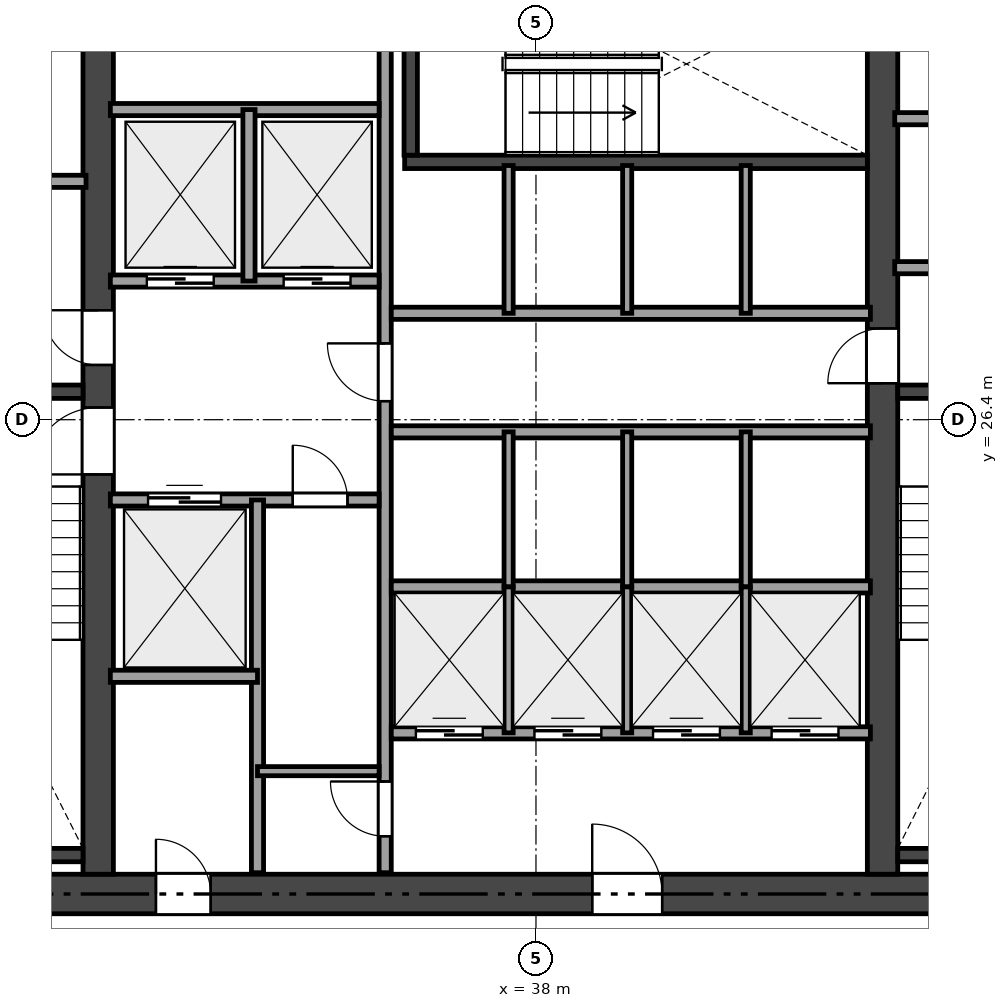
"""IFC4 building model, lengths in metres.
Left out: names, types, materials, properties, quantities, classifications, styles, units other than length and angle.
Written with IfcOpenShell. Run it as: python <this file> out.ifc"""

import sys

from ifc_helpers import new_model, si_unit, direction, frame, frame_2d, origin, place, context, subcontext, project, spatial, rectangle, extrude, element, fill, save


model = new_model("IFC4")
c1 = context("Model", 3, precision=1e-05, world=origin(), true_north=direction((0.0, 1.0)))
c2 = subcontext(c1, "Body", "Model", "MODEL_VIEW")
j1 = project(units=[si_unit("LENGTHUNIT", "METRE"), si_unit("PLANEANGLEUNIT", "RADIAN")], contexts=[c1])
p1 = place(None, origin())
s1 = spatial("IfcSite", under=j1, at=p1, CompositionType="ELEMENT")
p2 = place(p1, origin())
s2 = spatial("IfcBuilding", under=s1, at=p2, CompositionType="ELEMENT")
p3 = place(p2, frame((0.0, 0.0, 27.0)))
s3 = spatial("IfcBuildingStorey", under=s2, at=p3, CompositionType="ELEMENT", Elevation=27.0)
p4 = place(p3, frame((26.475, 18.6, 0.0), z_axis=(0.0, 0.0, 1.0), x_axis=(1.0, 0.0, 0.0)))
e1 = element("IfcWall", 1, at=p4, inside=s3, PredefinedType="SHEAR", context=c2, shape_type="SweptSolid", body=[
    extrude(rectangle(XDim=21.45, YDim=0.65, at=frame_2d((10.725, 0.0))), origin(), (0.0, 0.0, 1.0), 3.17),
])
p5 = place(p4, frame((12.45, 0.0, 0.0)))
e2 = element("IfcOpeningElement", 2, at=p5, cuts=e1, PredefinedType="OPENING", context=c2, shape_type="SweptSolid", body=[
    extrude(rectangle(XDim=1.15, YDim=2.15, at=frame_2d((0.575, 1.075))), frame((0.0, 0.335, 0.0), z_axis=(0.0, -1.0, 0.0), x_axis=(1.0, 0.0, 0.0)), (0.0, 0.0, 1.0), 0.67),
])
p6 = place(p4, frame((5.275, 0.0, 0.0)))
e3 = element("IfcOpeningElement", 3, at=p6, cuts=e1, PredefinedType="OPENING", context=c2, shape_type="SweptSolid", body=[
    extrude(rectangle(XDim=0.9, YDim=2.1, at=frame_2d((0.45, 1.05))), frame((0.0, 0.335, 0.0), z_axis=(0.0, -1.0, 0.0), x_axis=(1.0, 0.0, 0.0)), (0.0, 0.0, 1.0), 0.67),
])
p7 = place(p3, frame((30.8, 18.925, 0.0), z_axis=(0.0, 0.0, 1.0), x_axis=(0.0, 1.0, 0.0)))
e4 = element("IfcWall", 4, at=p7, inside=s3, PredefinedType="SHEAR", context=c2, shape_type="SweptSolid", body=[
    extrude(rectangle(XDim=14.95, YDim=0.5, at=frame_2d((7.475, 0.0))), origin(), (0.0, 0.0, 1.0), 3.17),
])
p8 = place(p7, frame((6.575, 0.0, 0.0)))
e5 = element("IfcOpeningElement", 5, at=p8, cuts=e4, PredefinedType="OPENING", context=c2, shape_type="SweptSolid", body=[
    extrude(rectangle(XDim=1.1, YDim=2.15, at=frame_2d((0.55, 1.075))), frame((0.0, 0.26, 0.0), z_axis=(0.0, -1.0, 0.0), x_axis=(1.0, 0.0, 0.0)), (0.0, 0.0, 1.0), 0.52),
])
p9 = place(p7, frame((8.375, 0.0, 0.0)))
e6 = element("IfcOpeningElement", 6, at=p9, cuts=e4, PredefinedType="OPENING", context=c2, shape_type="SweptSolid", body=[
    extrude(rectangle(XDim=0.9, YDim=2.1, at=frame_2d((0.45, 1.05))), frame((0.0, 0.26, 0.0), z_axis=(0.0, -1.0, 0.0), x_axis=(1.0, 0.0, 0.0)), (0.0, 0.0, 1.0), 0.52),
])
p10 = place(p3, frame((43.7, 18.925, 0.0), z_axis=(0.0, 0.0, 1.0), x_axis=(0.0, 1.0, 0.0)))
e7 = element("IfcWall", 7, at=p10, inside=s3, PredefinedType="SHEAR", context=c2, shape_type="SweptSolid", body=[
    extrude(rectangle(XDim=14.95, YDim=0.5, at=frame_2d((7.475, 0.0))), origin(), (0.0, 0.0, 1.0), 3.17),
])
p11 = place(p10, frame((8.075, 0.0, 0.0)))
e8 = element("IfcOpeningElement", 8, at=p11, cuts=e7, PredefinedType="OPENING", context=c2, shape_type="SweptSolid", body=[
    extrude(rectangle(XDim=0.9, YDim=2.1, at=frame_2d((0.45, 1.05))), frame((0.0, 0.26, 0.0), z_axis=(0.0, -1.0, 0.0), x_axis=(1.0, 0.0, 0.0)), (0.0, 0.0, 1.0), 0.52),
])
for number, where, z_axis, x_axis in (
    (9, (27.125, 26.86, 0.0), (0.0, 0.0, 1.0), (1.0, 0.0, 0.0)),
    (10, (27.125, 19.24, 0.0), (0.0, 0.0, 1.0), (1.0, 0.0, 0.0)),
):
    element("IfcWall", number, at=place(p3, frame(where, z_axis=z_axis, x_axis=x_axis)), inside=s3, PredefinedType="SHEAR", context=c2, shape_type="SweptSolid", body=[
        extrude(rectangle(XDim=3.425, YDim=0.22, at=frame_2d((1.712, 0.0))), origin(), (0.0, 0.0, 1.0), 3.17),
    ])
for number, where, z_axis, x_axis in (
    (11, (43.95, 26.86, 0.0), (0.0, 0.0, 1.0), (1.0, 0.0, 0.0)),
    (12, (43.95, 19.24, 0.0), (0.0, 0.0, 1.0), (1.0, 0.0, 0.0)),
):
    element("IfcWall", number, at=place(p3, frame(where, z_axis=z_axis, x_axis=x_axis)), inside=s3, PredefinedType="SHEAR", context=c2, shape_type="SweptSolid", body=[
        extrude(rectangle(XDim=3.325, YDim=0.22, at=frame_2d((1.663, 0.0))), origin(), (0.0, 0.0, 1.0), 3.17),
    ])
p12 = place(p3, frame((35.84, 30.64, 0.0), z_axis=(0.0, 0.0, 1.0), x_axis=(1.0, 0.0, 0.0)))
e13 = element("IfcWall", 13, at=p12, inside=s3, PredefinedType="SHEAR", context=c2, shape_type="SweptSolid", body=[
    extrude(rectangle(XDim=7.61, YDim=0.22, at=frame_2d((3.805, 0.0))), origin(), (0.0, 0.0, 1.0), 3.17),
])
p13 = place(p3, frame((35.94, 30.75, 0.0), z_axis=(0.0, 0.0, 1.0), x_axis=(0.0, 1.0, 0.0)))
e14 = element("IfcWall", 14, at=p13, inside=s3, PredefinedType="SHEAR", context=c2, shape_type="SweptSolid", body=[
    extrude(rectangle(XDim=3.125, YDim=0.22, at=frame_2d((1.562, 0.0))), origin(), (0.0, 0.0, 1.0), 3.17),
])
p14 = place(p3, frame((27.15, 30.32, 0.0), z_axis=(0.0, 0.0, 1.0), x_axis=(1.0, 0.0, 0.0)))
e15 = element("IfcWall", 15, at=p14, inside=s3, PredefinedType="SOLIDWALL", context=c2, shape_type="SweptSolid", body=[
    extrude(rectangle(XDim=3.45, YDim=0.2, at=frame_2d((1.725, 0.0))), origin(), (0.0, 0.0, 1.0), 3.17),
])
p15 = place(p3, frame((43.9, 28.9, 0.0), z_axis=(0.0, 0.0, 1.0), x_axis=(1.0, 0.0, 0.0)))
e16 = element("IfcWall", 16, at=p15, inside=s3, PredefinedType="SOLIDWALL", context=c2, shape_type="SweptSolid", body=[
    extrude(rectangle(XDim=3.35, YDim=0.2, at=frame_2d((1.675, 0.0))), origin(), (0.0, 0.0, 1.0), 3.17),
])
p16 = place(p15, frame((1.15, 0.0, 0.0)))
e17 = element("IfcOpeningElement", 17, at=p16, cuts=e16, PredefinedType="OPENING", context=c2, shape_type="SweptSolid", body=[
    extrude(rectangle(XDim=0.9, YDim=2.1, at=frame_2d((0.45, 1.05))), frame((0.0, 0.11, 0.0), z_axis=(0.0, -1.0, 0.0), x_axis=(1.0, 0.0, 0.0)), (0.0, 0.0, 1.0), 0.22),
])
p17 = place(p3, frame((43.9, 31.35, 0.0), z_axis=(0.0, 0.0, 1.0), x_axis=(1.0, 0.0, 0.0)))
e18 = element("IfcWall", 18, at=p17, inside=s3, PredefinedType="SOLIDWALL", context=c2, shape_type="SweptSolid", body=[
    extrude(rectangle(XDim=3.35, YDim=0.2, at=frame_2d((1.675, 0.0))), origin(), (0.0, 0.0, 1.0), 3.17),
])
p18 = place(p3, frame((35.52, 18.95, 0.0), z_axis=(0.0, 0.0, 1.0), x_axis=(0.0, 1.0, 0.0)))
e19 = element("IfcWall", 19, at=p18, inside=s3, PredefinedType="SOLIDWALL", context=c2, shape_type="SweptSolid", body=[
    extrude(rectangle(XDim=14.9, YDim=0.2, at=frame_2d((7.45, 0.0))), origin(), (0.0, 0.0, 1.0), 2.691),
])
p19 = place(p18, frame((7.755, 0.0, 0.0)))
e20 = element("IfcOpeningElement", 20, at=p19, cuts=e19, PredefinedType="OPENING", context=c2, shape_type="SweptSolid", body=[
    extrude(rectangle(XDim=0.95, YDim=2.15, at=frame_2d((0.475, 1.075))), frame((0.0, 0.11, 0.0), z_axis=(0.0, -1.0, 0.0), x_axis=(1.0, 0.0, 0.0)), (0.0, 0.0, 1.0), 0.22),
])
p20 = place(p18, frame((0.6, 0.0, 0.0)))
e21 = element("IfcOpeningElement", 21, at=p20, cuts=e19, PredefinedType="OPENING", context=c2, shape_type="SweptSolid", body=[
    extrude(rectangle(XDim=0.9, YDim=2.1, at=frame_2d((0.45, 1.05))), frame((0.0, 0.11, 0.0), z_axis=(0.0, -1.0, 0.0), x_axis=(1.0, 0.0, 0.0)), (0.0, 0.0, 1.0), 0.22),
])
p21 = place(p3, frame((31.0, 28.68, 0.0), z_axis=(0.0, 0.0, 1.0), x_axis=(1.0, 0.0, 0.0)))
e22 = element("IfcWall", 22, at=p21, inside=s3, PredefinedType="SOLIDWALL", context=c2, shape_type="SweptSolid", body=[
    extrude(rectangle(XDim=4.42, YDim=0.2, at=frame_2d((2.21, 0.0))), origin(), (0.0, 0.0, 1.0), 3.17),
])
p22 = place(p21, frame((0.6, 0.0, 0.0)))
e23 = element("IfcOpeningElement", 23, at=p22, cuts=e22, PredefinedType="OPENING", context=c2, shape_type="SweptSolid", body=[
    extrude(rectangle(XDim=1.1, YDim=2.15, at=frame_2d((0.55, 1.075))), frame((0.0, 0.11, 0.0), z_axis=(0.0, -1.0, 0.0), x_axis=(1.0, 0.0, 0.0)), (0.0, 0.0, 1.0), 0.22),
])
p23 = place(p21, frame((2.85, 0.0, 0.0)))
e24 = element("IfcOpeningElement", 24, at=p23, cuts=e22, PredefinedType="OPENING", context=c2, shape_type="SweptSolid", body=[
    extrude(rectangle(XDim=1.1, YDim=2.15, at=frame_2d((0.55, 1.075))), frame((0.0, 0.11, 0.0), z_axis=(0.0, -1.0, 0.0), x_axis=(1.0, 0.0, 0.0)), (0.0, 0.0, 1.0), 0.22),
])
p24 = place(p3, frame((31.0, 31.5, 0.0), z_axis=(0.0, 0.0, 1.0), x_axis=(1.0, 0.0, 0.0)))
e25 = element("IfcWall", 25, at=p24, inside=s3, PredefinedType="SOLIDWALL", context=c2, shape_type="SweptSolid", body=[
    extrude(rectangle(XDim=4.42, YDim=0.2, at=frame_2d((2.21, 0.0))), origin(), (0.0, 0.0, 1.0), 3.17),
])
p25 = place(p3, frame((33.28, 28.68, 0.0), z_axis=(0.0, 0.0, 1.0), x_axis=(0.0, 1.0, 0.0)))
e26 = element("IfcWall", 26, at=p25, inside=s3, PredefinedType="SOLIDWALL", context=c2, shape_type="SweptSolid", body=[
    extrude(rectangle(XDim=2.82, YDim=0.2, at=frame_2d((1.41, 0.0))), origin(), (0.0, 0.0, 1.0), 3.17),
])
p26 = place(p3, frame((31.0, 25.08, 0.0), z_axis=(0.0, 0.0, 1.0), x_axis=(1.0, 0.0, 0.0)))
e27 = element("IfcWall", 27, at=p26, inside=s3, PredefinedType="SOLIDWALL", context=c2, shape_type="SweptSolid", body=[
    extrude(rectangle(XDim=4.42, YDim=0.2, at=frame_2d((2.21, 0.0))), origin(), (0.0, 0.0, 1.0), 3.17),
])
p27 = place(p26, frame((3.0, 0.0, 0.0)))
e28 = element("IfcOpeningElement", 28, at=p27, cuts=e27, PredefinedType="OPENING", context=c2, shape_type="SweptSolid", body=[
    extrude(rectangle(XDim=0.9, YDim=2.1, at=frame_2d((0.45, 1.05))), frame((0.0, 0.11, 0.0), z_axis=(0.0, -1.0, 0.0), x_axis=(1.0, 0.0, 0.0)), (0.0, 0.0, 1.0), 0.22),
])
p28 = place(p26, frame((0.62, 0.0, 0.0)))
e29 = element("IfcOpeningElement", 29, at=p28, cuts=e27, PredefinedType="OPENING", context=c2, shape_type="SweptSolid", body=[
    extrude(rectangle(XDim=1.2, YDim=2.15, at=frame_2d((0.6, 1.075))), frame((0.0, 0.11, 0.0), z_axis=(0.0, -1.0, 0.0), x_axis=(1.0, 0.0, 0.0)), (0.0, 0.0, 1.0), 0.22),
])
p29 = place(p3, frame((33.42, 18.95, 0.0), z_axis=(0.0, 0.0, 1.0), x_axis=(0.0, 1.0, 0.0)))
e30 = element("IfcWall", 30, at=p29, inside=s3, PredefinedType="SOLIDWALL", context=c2, shape_type="SweptSolid", body=[
    extrude(rectangle(XDim=6.13, YDim=0.2, at=frame_2d((3.065, 0.0))), origin(), (0.0, 0.0, 1.0), 2.691),
])
p30 = place(p3, frame((31.0, 22.18, 0.0), z_axis=(0.0, 0.0, 1.0), x_axis=(1.0, 0.0, 0.0)))
e31 = element("IfcWall", 31, at=p30, inside=s3, PredefinedType="SOLIDWALL", context=c2, shape_type="SweptSolid", body=[
    extrude(rectangle(XDim=2.42, YDim=0.2, at=frame_2d((1.21, 0.0))), origin(), (0.0, 0.0, 1.0), 3.17),
])
p31 = place(p3, frame((33.42, 20.62, 0.0), z_axis=(0.0, 0.0, 1.0), x_axis=(1.0, 0.0, 0.0)))
e32 = element("IfcWall", 32, at=p31, inside=s3, PredefinedType="PARTITIONING", context=c2, shape_type="SweptSolid", body=[
    extrude(rectangle(XDim=2.0, YDim=0.15, at=frame_2d((1.0, 0.0))), origin(), (0.0, 0.0, 1.0), 3.17),
])
for number, where, z_axis, x_axis in (
    (33, (35.62, 28.15, 0.0), (0.0, 0.0, 1.0), (1.0, 0.0, 0.0)),
    (34, (35.62, 26.2, 0.0), (0.0, 0.0, 1.0), (1.0, 0.0, 0.0)),
):
    element("IfcWall", number, at=place(p3, frame(where, z_axis=z_axis, x_axis=x_axis)), inside=s3, PredefinedType="SOLIDWALL", context=c2, shape_type="SweptSolid", body=[
        extrude(rectangle(XDim=7.88, YDim=0.2, at=frame_2d((3.94, 0.0))), origin(), (0.0, 0.0, 1.0), 3.17),
    ])
p32 = place(p3, frame((35.62, 23.65, 0.0), z_axis=(0.0, 0.0, 1.0), x_axis=(1.0, 0.0, 0.0)))
e35 = element("IfcWall", 35, at=p32, inside=s3, PredefinedType="SOLIDWALL", context=c2, shape_type="SweptSolid", body=[
    extrude(rectangle(XDim=7.88, YDim=0.2, at=frame_2d((3.94, 0.0))), origin(), (0.0, 0.0, 1.0), 2.691),
])
p33 = place(p3, frame((35.62, 21.25, 0.0), z_axis=(0.0, 0.0, 1.0), x_axis=(1.0, 0.0, 0.0)))
e36 = element("IfcWall", 36, at=p33, inside=s3, PredefinedType="SOLIDWALL", context=c2, shape_type="SweptSolid", body=[
    extrude(rectangle(XDim=7.88, YDim=0.2, at=frame_2d((3.94, 0.0))), origin(), (0.0, 0.0, 1.0), 3.17),
])
p34 = place(p33, frame((0.405, 0.0, 0.0)))
e37 = element("IfcOpeningElement", 37, at=p34, cuts=e36, PredefinedType="OPENING", context=c2, shape_type="SweptSolid", body=[
    extrude(rectangle(XDim=1.1, YDim=2.15, at=frame_2d((0.55, 1.075))), frame((0.0, 0.11, 0.0), z_axis=(0.0, -1.0, 0.0), x_axis=(1.0, 0.0, 0.0)), (0.0, 0.0, 1.0), 0.22),
])
p35 = place(p33, frame((2.355, 0.0, 0.0)))
e38 = element("IfcOpeningElement", 38, at=p35, cuts=e36, PredefinedType="OPENING", context=c2, shape_type="SweptSolid", body=[
    extrude(rectangle(XDim=1.1, YDim=2.15, at=frame_2d((0.55, 1.075))), frame((0.0, 0.11, 0.0), z_axis=(0.0, -1.0, 0.0), x_axis=(1.0, 0.0, 0.0)), (0.0, 0.0, 1.0), 0.22),
])
p36 = place(p33, frame((4.305, 0.0, 0.0)))
e39 = element("IfcOpeningElement", 39, at=p36, cuts=e36, PredefinedType="OPENING", context=c2, shape_type="SweptSolid", body=[
    extrude(rectangle(XDim=1.1, YDim=2.15, at=frame_2d((0.55, 1.075))), frame((0.0, 0.11, 0.0), z_axis=(0.0, -1.0, 0.0), x_axis=(1.0, 0.0, 0.0)), (0.0, 0.0, 1.0), 0.22),
])
p37 = place(p33, frame((6.255, 0.0, 0.0)))
e40 = element("IfcOpeningElement", 40, at=p37, cuts=e36, PredefinedType="OPENING", context=c2, shape_type="SweptSolid", body=[
    extrude(rectangle(XDim=1.1, YDim=2.15, at=frame_2d((0.55, 1.075))), frame((0.0, 0.11, 0.0), z_axis=(0.0, -1.0, 0.0), x_axis=(1.0, 0.0, 0.0)), (0.0, 0.0, 1.0), 0.22),
])
for number, where, z_axis, x_axis in (
    (41, (37.55, 28.15, 0.0), (0.0, 0.0, 1.0), (0.0, 1.0, 0.0)),
    (42, (39.5, 28.15, 0.0), (0.0, 0.0, 1.0), (0.0, 1.0, 0.0)),
    (43, (41.45, 28.15, 0.0), (0.0, 0.0, 1.0), (0.0, 1.0, 0.0)),
):
    element("IfcWall", number, at=place(p3, frame(where, z_axis=z_axis, x_axis=x_axis)), inside=s3, PredefinedType="PARTITIONING", context=c2, shape_type="SweptSolid", body=[
        extrude(rectangle(XDim=2.43, YDim=0.15, at=frame_2d((1.215, 0.0))), origin(), (0.0, 0.0, 1.0), 3.17),
    ])
for number, where, z_axis, x_axis in (
    (44, (37.55, 23.65, 0.0), (0.0, 0.0, 1.0), (0.0, 1.0, 0.0)),
    (45, (39.5, 23.65, 0.0), (0.0, 0.0, 1.0), (0.0, 1.0, 0.0)),
    (46, (41.45, 23.65, 0.0), (0.0, 0.0, 1.0), (0.0, 1.0, 0.0)),
):
    element("IfcWall", number, at=place(p3, frame(where, z_axis=z_axis, x_axis=x_axis)), inside=s3, PredefinedType="PARTITIONING", context=c2, shape_type="SweptSolid", body=[
        extrude(rectangle(XDim=2.55, YDim=0.15, at=frame_2d((1.275, 0.0))), origin(), (0.0, 0.0, 1.0), 2.691),
    ])
for number, where, z_axis, x_axis in (
    (47, (37.55, 21.25, 0.0), (0.0, 0.0, 1.0), (0.0, 1.0, 0.0)),
    (48, (39.5, 21.25, 0.0), (0.0, 0.0, 1.0), (0.0, 1.0, 0.0)),
    (49, (41.45, 21.25, 0.0), (0.0, 0.0, 1.0), (0.0, 1.0, 0.0)),
):
    element("IfcWall", number, at=place(p3, frame(where, z_axis=z_axis, x_axis=x_axis)), inside=s3, PredefinedType="PARTITIONING", context=c2, shape_type="SweptSolid", body=[
        extrude(rectangle(XDim=2.4, YDim=0.15, at=frame_2d((1.2, 0.0))), origin(), (0.0, 0.0, 1.0), 2.691),
    ])
p38 = place(p8, origin())
e50 = element("IfcDoor", 50, at=p38, inside=s3, OperationType="SINGLE_SWING_LEFT", PredefinedType="DOOR", context=c2, shape_type="SweptSolid", body=[
    extrude(rectangle(XDim=1.1, YDim=2.15, at=frame_2d((0.55, 1.075))), frame((0.0, 0.025, 0.0), z_axis=(0.0, -1.0, 0.0), x_axis=(1.0, 0.0, 0.0)), (0.0, 0.0, 1.0), 0.05),
])
fill(e5, e50)
p39 = place(p19, origin())
e51 = element("IfcDoor", 51, at=p39, inside=s3, OperationType="SINGLE_SWING_RIGHT", PredefinedType="DOOR", context=c2, shape_type="SweptSolid", body=[
    extrude(rectangle(XDim=0.95, YDim=2.15, at=frame_2d((0.475, 1.075))), frame((0.0, 0.025, 0.0), z_axis=(0.0, -1.0, 0.0), x_axis=(1.0, 0.0, 0.0)), (0.0, 0.0, 1.0), 0.05),
])
fill(e20, e51)
p40 = place(p11, origin())
e52 = element("IfcDoor", 52, at=p40, inside=s3, OperationType="SINGLE_SWING_LEFT", PredefinedType="DOOR", context=c2, shape_type="SweptSolid", body=[
    extrude(rectangle(XDim=0.9, YDim=2.1, at=frame_2d((0.45, 1.05))), frame((0.0, 0.025, 0.0), z_axis=(0.0, -1.0, 0.0), x_axis=(1.0, 0.0, 0.0)), (0.0, 0.0, 1.0), 0.05),
])
fill(e8, e52)
p41 = place(p5, origin())
e53 = element("IfcDoor", 53, at=p41, inside=s3, OperationType="SINGLE_SWING_LEFT", PredefinedType="DOOR", context=c2, shape_type="SweptSolid", body=[
    extrude(rectangle(XDim=1.15, YDim=2.15, at=frame_2d((0.575, 1.075))), frame((0.0, 0.025, 0.0), z_axis=(0.0, -1.0, 0.0), x_axis=(1.0, 0.0, 0.0)), (0.0, 0.0, 1.0), 0.05),
])
fill(e2, e53)
p42 = place(p9, origin())
e54 = element("IfcDoor", 54, at=p42, inside=s3, OperationType="SINGLE_SWING_RIGHT", PredefinedType="DOOR", context=c2, shape_type="SweptSolid", body=[
    extrude(rectangle(XDim=0.9, YDim=2.1, at=frame_2d((0.45, 1.05))), frame((0.0, 0.025, 0.0), z_axis=(0.0, -1.0, 0.0), x_axis=(1.0, 0.0, 0.0)), (0.0, 0.0, 1.0), 0.05),
])
fill(e6, e54)
p43 = place(p6, origin())
e55 = element("IfcDoor", 55, at=p43, inside=s3, OperationType="SINGLE_SWING_LEFT", PredefinedType="DOOR", context=c2, shape_type="SweptSolid", body=[
    extrude(rectangle(XDim=0.9, YDim=2.1, at=frame_2d((0.45, 1.05))), frame((0.0, 0.025, 0.0), z_axis=(0.0, -1.0, 0.0), x_axis=(1.0, 0.0, 0.0)), (0.0, 0.0, 1.0), 0.05),
])
fill(e3, e55)
p44 = place(p20, origin())
e56 = element("IfcDoor", 56, at=p44, inside=s3, OperationType="SINGLE_SWING_RIGHT", PredefinedType="DOOR", context=c2, shape_type="SweptSolid", body=[
    extrude(rectangle(XDim=0.9, YDim=2.1, at=frame_2d((0.45, 1.05))), frame((0.0, 0.025, 0.0), z_axis=(0.0, -1.0, 0.0), x_axis=(1.0, 0.0, 0.0)), (0.0, 0.0, 1.0), 0.05),
])
fill(e21, e56)
p45 = place(p27, origin())
e57 = element("IfcDoor", 57, at=p45, inside=s3, OperationType="SINGLE_SWING_LEFT", PredefinedType="DOOR", context=c2, shape_type="SweptSolid", body=[
    extrude(rectangle(XDim=0.9, YDim=2.1, at=frame_2d((0.45, 1.05))), frame((0.0, 0.025, 0.0), z_axis=(0.0, -1.0, 0.0), x_axis=(1.0, 0.0, 0.0)), (0.0, 0.0, 1.0), 0.05),
])
fill(e28, e57)
p46 = place(p22, origin())
e58 = element("IfcDoor", 58, at=p46, inside=s3, OperationType="SLIDING_TO_LEFT", PredefinedType="DOOR", context=c2, shape_type="SweptSolid", body=[
    extrude(rectangle(XDim=1.1, YDim=2.15, at=frame_2d((0.55, 1.075))), frame((0.0, 0.025, 0.0), z_axis=(0.0, -1.0, 0.0), x_axis=(1.0, 0.0, 0.0)), (0.0, 0.0, 1.0), 0.05),
])
fill(e23, e58)
p47 = place(p23, origin())
e59 = element("IfcDoor", 59, at=p47, inside=s3, OperationType="SLIDING_TO_LEFT", PredefinedType="DOOR", context=c2, shape_type="SweptSolid", body=[
    extrude(rectangle(XDim=1.1, YDim=2.15, at=frame_2d((0.55, 1.075))), frame((0.0, 0.025, 0.0), z_axis=(0.0, -1.0, 0.0), x_axis=(1.0, 0.0, 0.0)), (0.0, 0.0, 1.0), 0.05),
])
fill(e24, e59)
p48 = place(p28, origin())
e60 = element("IfcDoor", 60, at=p48, inside=s3, OperationType="SLIDING_TO_LEFT", PredefinedType="DOOR", context=c2, shape_type="SweptSolid", body=[
    extrude(rectangle(XDim=1.2, YDim=2.15, at=frame_2d((0.6, 1.075))), frame((0.0, 0.025, 0.0), z_axis=(0.0, -1.0, 0.0), x_axis=(1.0, 0.0, 0.0)), (0.0, 0.0, 1.0), 0.05),
])
fill(e29, e60)
p49 = place(p34, origin())
e61 = element("IfcDoor", 61, at=p49, inside=s3, OperationType="SLIDING_TO_LEFT", PredefinedType="DOOR", context=c2, shape_type="SweptSolid", body=[
    extrude(rectangle(XDim=1.1, YDim=2.15, at=frame_2d((0.55, 1.075))), frame((0.0, 0.025, 0.0), z_axis=(0.0, -1.0, 0.0), x_axis=(1.0, 0.0, 0.0)), (0.0, 0.0, 1.0), 0.05),
])
fill(e37, e61)
p50 = place(p35, origin())
e62 = element("IfcDoor", 62, at=p50, inside=s3, OperationType="SLIDING_TO_LEFT", PredefinedType="DOOR", context=c2, shape_type="SweptSolid", body=[
    extrude(rectangle(XDim=1.1, YDim=2.15, at=frame_2d((0.55, 1.075))), frame((0.0, 0.025, 0.0), z_axis=(0.0, -1.0, 0.0), x_axis=(1.0, 0.0, 0.0)), (0.0, 0.0, 1.0), 0.05),
])
fill(e38, e62)
p51 = place(p36, origin())
e63 = element("IfcDoor", 63, at=p51, inside=s3, OperationType="SLIDING_TO_LEFT", PredefinedType="DOOR", context=c2, shape_type="SweptSolid", body=[
    extrude(rectangle(XDim=1.1, YDim=2.15, at=frame_2d((0.55, 1.075))), frame((0.0, 0.025, 0.0), z_axis=(0.0, -1.0, 0.0), x_axis=(1.0, 0.0, 0.0)), (0.0, 0.0, 1.0), 0.05),
])
fill(e39, e63)
p52 = place(p37, origin())
e64 = element("IfcDoor", 64, at=p52, inside=s3, OperationType="SLIDING_TO_LEFT", PredefinedType="DOOR", context=c2, shape_type="SweptSolid", body=[
    extrude(rectangle(XDim=1.1, YDim=2.15, at=frame_2d((0.55, 1.075))), frame((0.0, 0.025, 0.0), z_axis=(0.0, -1.0, 0.0), x_axis=(1.0, 0.0, 0.0)), (0.0, 0.0, 1.0), 0.05),
])
fill(e40, e64)
save(model, sys.argv[1])
